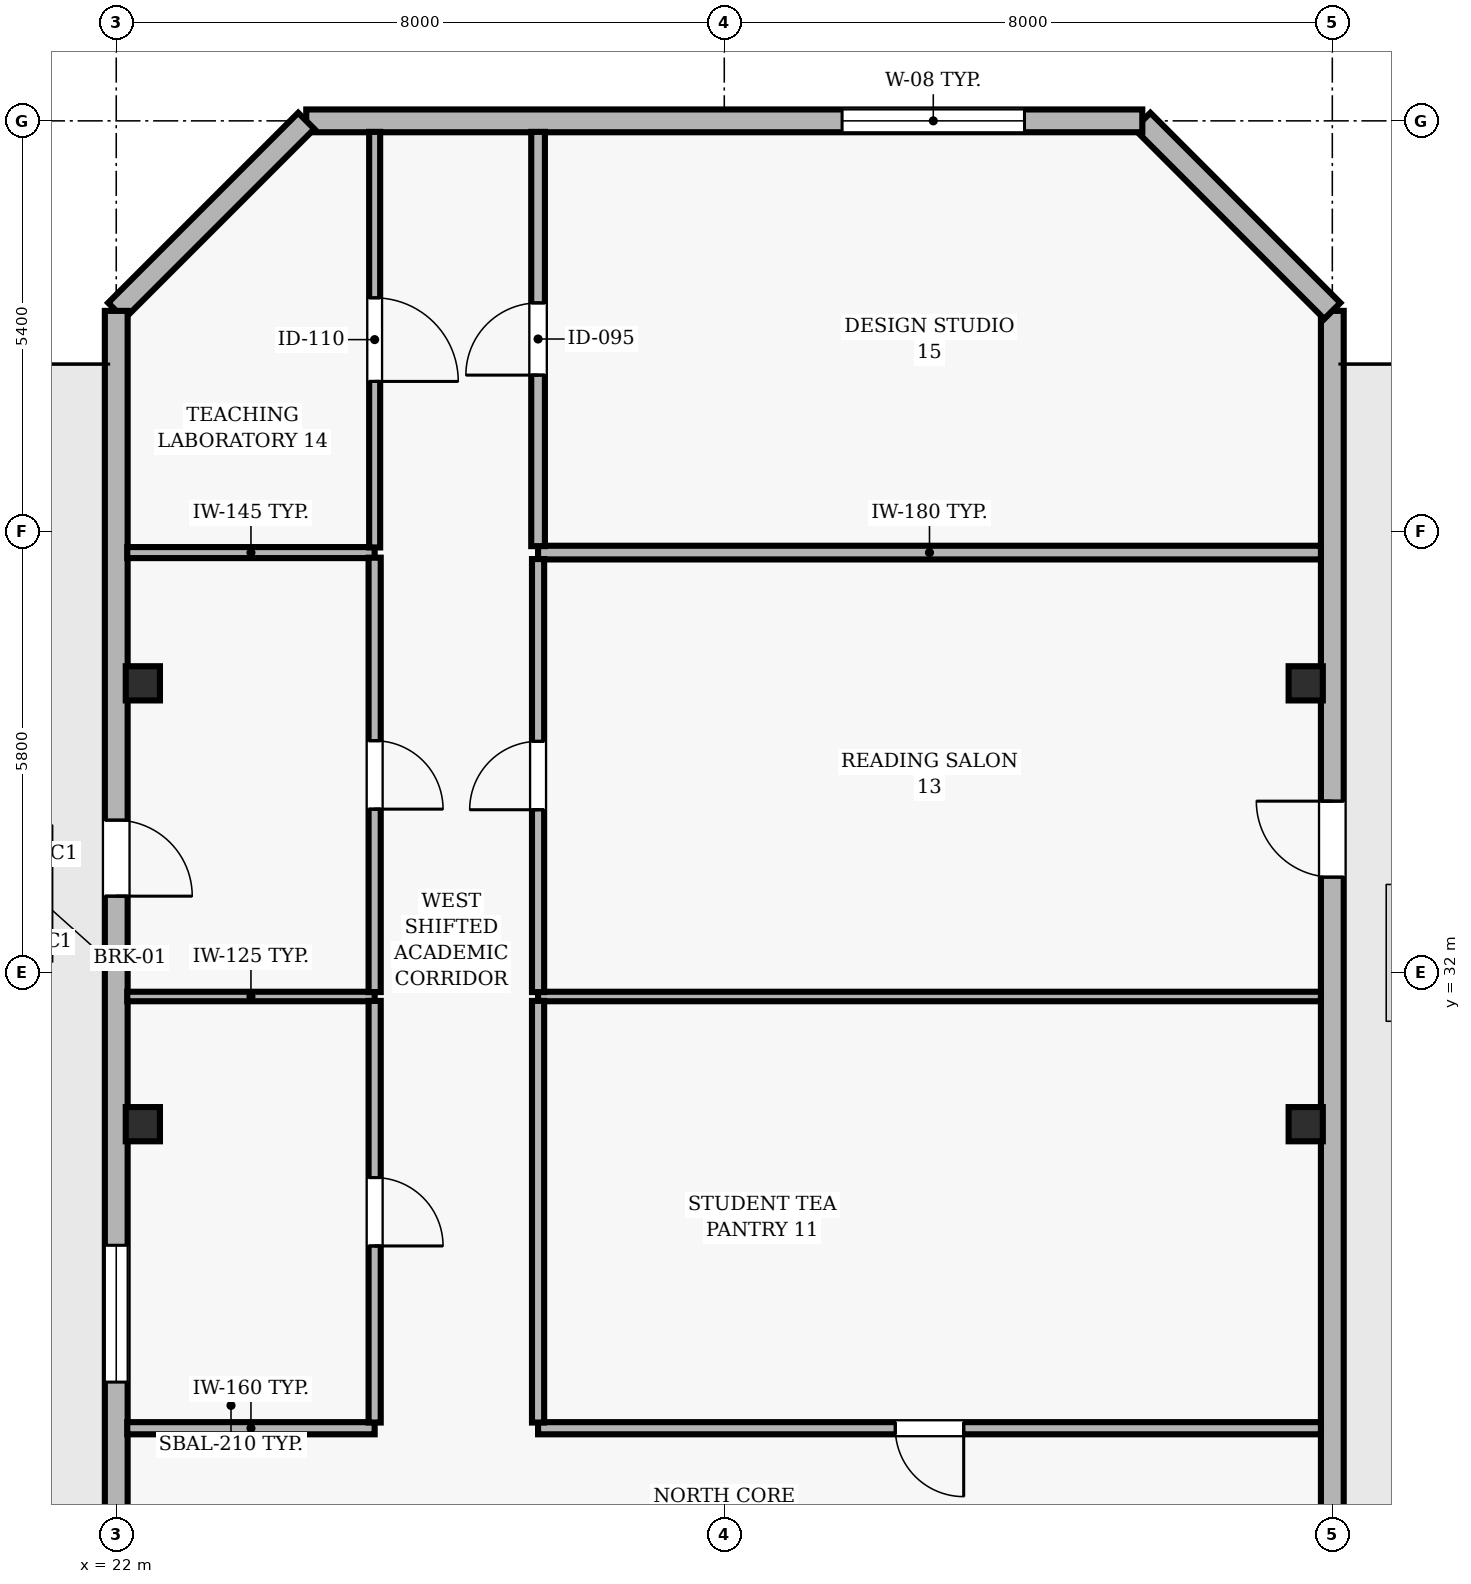
"""IFC4 building model, lengths in metres.
Left out: names, types, materials, properties, quantities, classifications, styles, units other than length and angle.
Written with IfcOpenShell. Run it as: python <this file> out.ifc"""

import sys

from ifc_helpers import new_model, si_unit, direction, frame, frame_2d, origin, origin_2d, place, context, subcontext, project, spatial, rectangle, hollow_rectangle, extrude, element, fill, save


model = new_model("IFC4")
c1 = context("Model", 3, precision=1e-05, world=origin(), true_north=direction((0.0, 1.0)))
c2 = subcontext(c1, "Body", "Model", "MODEL_VIEW")
j1 = project(units=[si_unit("LENGTHUNIT", "METRE"), si_unit("PLANEANGLEUNIT", "RADIAN")], contexts=[c1])
p1 = place(None, origin())
s1 = spatial("IfcSite", under=j1, at=p1, CompositionType="ELEMENT")
p2 = place(p1, origin())
s2 = spatial("IfcBuilding", under=s1, at=p2, CompositionType="ELEMENT")
p3 = place(p2, frame((0.0, 0.0, 234.3)))
s3 = spatial("IfcBuildingStorey", under=s2, at=p3, CompositionType="ELEMENT", Elevation=234.3)
for number, where, z_axis, x_axis in (
    (1, (22.35, 30.0, 0.0), (0.0, 0.0, 1.0), (1.0, 0.0, 0.0)),
    (2, (37.65, 30.0, 0.0), (0.0, 0.0, 1.0), (1.0, 0.0, 0.0)),
    (3, (22.35, 35.8, 0.0), (0.0, 0.0, 1.0), (1.0, 0.0, 0.0)),
    (4, (37.65, 35.8, 0.0), (0.0, 0.0, 1.0), (1.0, 0.0, 0.0)),
):
    element("IfcColumn", number, at=place(p3, frame(where, z_axis=z_axis, x_axis=x_axis)), inside=s3, PredefinedType="COLUMN", context=c2, shape_type="SweptSolid", body=[
        extrude(hollow_rectangle(XDim=0.45, YDim=0.45, WallThickness=0.02, at=origin_2d()), origin(), (0.0, 0.0, 1.0), 3.9),
    ])
p4 = place(p3, frame((38.0, 22.2, 0.0), z_axis=(0.0, 0.0, 1.0), x_axis=(0.0, 1.0, 0.0)))
e5 = element("IfcWall", 5, at=p4, inside=s3, PredefinedType="SOLIDWALL", context=c2, shape_type="SweptSolid", body=[
    extrude(rectangle(XDim=18.5, YDim=0.3, at=frame_2d((9.25, 0.0))), origin(), (0.0, 0.0, 1.0), 3.64),
])
p5 = place(p4, frame((11.05, 0.0, 0.0)))
e6 = element("IfcOpeningElement", 6, at=p5, cuts=e5, PredefinedType="OPENING", context=c2, shape_type="SweptSolid", body=[
    extrude(rectangle(XDim=1.0, YDim=2.2, at=frame_2d((0.5, 1.1))), frame((0.0, 0.16, 0.0), z_axis=(0.0, -1.0, 0.0), x_axis=(1.0, 0.0, 0.0)), (0.0, 0.0, 1.0), 0.32),
])
p6 = place(p3, frame((38.0, 40.7, 0.0), z_axis=(0.0, 0.0, 1.0), x_axis=(-0.707106781187, 0.707106781187, 0.0)))
e7 = element("IfcWall", 7, at=p6, inside=s3, PredefinedType="SOLIDWALL", context=c2, shape_type="SweptSolid", body=[
    extrude(rectangle(XDim=3.536, YDim=0.3, at=frame_2d((1.768, 0.0))), origin(), (0.0, 0.0, 1.0), 3.64),
])
p7 = place(p3, frame((35.5, 43.2, 0.0), z_axis=(0.0, 0.0, 1.0), x_axis=(-1.0, 0.0, 0.0)))
e8 = element("IfcWall", 8, at=p7, inside=s3, PredefinedType="SOLIDWALL", context=c2, shape_type="SweptSolid", body=[
    extrude(rectangle(XDim=11.0, YDim=0.3, at=frame_2d((5.5, 0.0))), origin(), (0.0, 0.0, 1.0), 3.64),
])
p8 = place(p7, frame((1.55, 0.0, 0.9)))
e9 = element("IfcOpeningElement", 9, at=p8, cuts=e8, PredefinedType="OPENING", context=c2, shape_type="SweptSolid", body=[
    extrude(rectangle(XDim=2.4, YDim=1.8, at=frame_2d((1.2, 0.9))), frame((0.0, 0.16, 0.0), z_axis=(0.0, -1.0, 0.0), x_axis=(1.0, 0.0, 0.0)), (0.0, 0.0, 1.0), 0.32),
])
p9 = place(p3, frame((24.5, 43.2, 0.0), z_axis=(0.0, 0.0, 1.0), x_axis=(-0.707106781187, -0.707106781187, 0.0)))
e10 = element("IfcWall", 10, at=p9, inside=s3, PredefinedType="SOLIDWALL", context=c2, shape_type="SweptSolid", body=[
    extrude(rectangle(XDim=3.536, YDim=0.3, at=frame_2d((1.768, 0.0))), origin(), (0.0, 0.0, 1.0), 3.64),
])
p10 = place(p3, frame((22.0, 40.7, 0.0), z_axis=(0.0, 0.0, 1.0), x_axis=(0.0, -1.0, 0.0)))
e11 = element("IfcWall", 11, at=p10, inside=s3, PredefinedType="SOLIDWALL", context=c2, shape_type="SweptSolid", body=[
    extrude(rectangle(XDim=38.2, YDim=0.3, at=frame_2d((19.1, 0.0))), origin(), (0.0, 0.0, 1.0), 3.64),
])
p11 = place(p10, frame((6.7, 0.0, 0.0)))
e12 = element("IfcOpeningElement", 12, at=p11, cuts=e11, PredefinedType="OPENING", context=c2, shape_type="SweptSolid", body=[
    extrude(rectangle(XDim=1.0, YDim=2.2, at=frame_2d((0.5, 1.1))), frame((0.0, 0.16, 0.0), z_axis=(0.0, -1.0, 0.0), x_axis=(1.0, 0.0, 0.0)), (0.0, 0.0, 1.0), 0.32),
])
p12 = place(p10, frame((12.293, 0.0, 0.9)))
e13 = element("IfcOpeningElement", 13, at=p12, cuts=e11, PredefinedType="OPENING", context=c2, shape_type="SweptSolid", body=[
    extrude(rectangle(XDim=1.8, YDim=2.2, at=frame_2d((0.9, 1.1))), frame((0.0, 0.16, 0.0), z_axis=(0.0, -1.0, 0.0), x_axis=(1.0, 0.0, 0.0)), (0.0, 0.0, 1.0), 0.32),
])
p13 = place(p10, frame((18.2, 0.0, 0.9)))
e14 = element("IfcOpeningElement", 14, at=p13, cuts=e11, PredefinedType="OPENING", context=c2, shape_type="SweptSolid", body=[
    extrude(rectangle(XDim=1.8, YDim=2.2, at=frame_2d((0.9, 1.1))), frame((0.0, 0.16, 0.0), z_axis=(0.0, -1.0, 0.0), x_axis=(1.0, 0.0, 0.0)), (0.0, 0.0, 1.0), 0.32),
])
p14 = place(p10, frame((23.207, 0.0, 0.9)))
e15 = element("IfcOpeningElement", 15, at=p14, cuts=e11, PredefinedType="OPENING", context=c2, shape_type="SweptSolid", body=[
    extrude(rectangle(XDim=1.8, YDim=2.2, at=frame_2d((0.9, 1.1))), frame((0.0, 0.16, 0.0), z_axis=(0.0, -1.0, 0.0), x_axis=(1.0, 0.0, 0.0)), (0.0, 0.0, 1.0), 0.32),
])
p15 = place(p10, frame((29.114, 0.0, 0.9)))
e16 = element("IfcOpeningElement", 16, at=p15, cuts=e11, PredefinedType="OPENING", context=c2, shape_type="SweptSolid", body=[
    extrude(rectangle(XDim=1.8, YDim=2.2, at=frame_2d((0.9, 1.1))), frame((0.0, 0.16, 0.0), z_axis=(0.0, -1.0, 0.0), x_axis=(1.0, 0.0, 0.0)), (0.0, 0.0, 1.0), 0.32),
])
p16 = place(p3, frame((25.4, 26.0, 0.0), z_axis=(0.0, 0.0, 1.0), x_axis=(-1.0, 0.0, 0.0)))
e17 = element("IfcWall", 17, at=p16, inside=s3, PredefinedType="PARTITIONING", context=c2, shape_type="SweptSolid", body=[
    extrude(rectangle(XDim=3.255, YDim=0.16, at=frame_2d((1.627, 0.0))), origin(), (0.0, 0.0, 1.0), 3.64),
])
p17 = place(p3, frame((25.4, 31.68, 0.0), z_axis=(0.0, 0.0, 1.0), x_axis=(-1.0, 0.0, 0.0)))
e18 = element("IfcWall", 18, at=p17, inside=s3, PredefinedType="PARTITIONING", context=c2, shape_type="SweptSolid", body=[
    extrude(rectangle(XDim=3.255, YDim=0.125, at=frame_2d((1.627, 0.0))), origin(), (0.0, 0.0, 1.0), 3.64),
])
p18 = place(p3, frame((25.4, 37.52, 0.0), z_axis=(0.0, 0.0, 1.0), x_axis=(-1.0, 0.0, 0.0)))
e19 = element("IfcWall", 19, at=p18, inside=s3, PredefinedType="PARTITIONING", context=c2, shape_type="SweptSolid", body=[
    extrude(rectangle(XDim=3.255, YDim=0.145, at=frame_2d((1.627, 0.0))), origin(), (0.0, 0.0, 1.0), 3.64),
])
p19 = place(p3, frame((37.85, 26.0, 0.0), z_axis=(0.0, 0.0, 1.0), x_axis=(-1.0, 0.0, 0.0)))
e20 = element("IfcWall", 20, at=p19, inside=s3, PredefinedType="PARTITIONING", context=c2, shape_type="SweptSolid", body=[
    extrude(rectangle(XDim=10.3, YDim=0.16, at=frame_2d((5.15, 0.0))), origin(), (0.0, 0.0, 1.0), 3.64),
])
p20 = place(p19, frame((4.7, 0.0, 0.0)))
e21 = element("IfcOpeningElement", 21, at=p20, cuts=e20, PredefinedType="OPENING", context=c2, shape_type="SweptSolid", body=[
    extrude(rectangle(XDim=0.9, YDim=2.1, at=frame_2d((0.45, 1.05))), frame((0.0, 0.09, 0.0), z_axis=(0.0, -1.0, 0.0), x_axis=(1.0, 0.0, 0.0)), (0.0, 0.0, 1.0), 0.18),
])
p21 = place(p3, frame((37.85, 31.68, 0.0), z_axis=(0.0, 0.0, 1.0), x_axis=(-1.0, 0.0, 0.0)))
e22 = element("IfcWall", 22, at=p21, inside=s3, PredefinedType="PARTITIONING", context=c2, shape_type="SweptSolid", body=[
    extrude(rectangle(XDim=10.3, YDim=0.125, at=frame_2d((5.15, 0.0))), origin(), (0.0, 0.0, 1.0), 3.64),
])
p22 = place(p3, frame((37.85, 37.52, 0.0), z_axis=(0.0, 0.0, 1.0), x_axis=(-1.0, 0.0, 0.0)))
e23 = element("IfcWall", 23, at=p22, inside=s3, PredefinedType="PARTITIONING", context=c2, shape_type="SweptSolid", body=[
    extrude(rectangle(XDim=10.3, YDim=0.18, at=frame_2d((5.15, 0.0))), origin(), (0.0, 0.0, 1.0), 3.64),
])
p23 = place(p3, frame((25.4, 31.622, 0.0), z_axis=(0.0, 0.0, 1.0), x_axis=(0.0, -1.0, 0.0)))
e24 = element("IfcWall", 24, at=p23, inside=s3, PredefinedType="PARTITIONING", context=c2, shape_type="SweptSolid", body=[
    extrude(rectangle(XDim=5.547, YDim=0.16, at=frame_2d((2.773, 0.0))), origin(), (0.0, 0.0, 1.0), 3.64),
])
p24 = place(p23, frame((2.324, 0.0, 0.0)))
e25 = element("IfcOpeningElement", 25, at=p24, cuts=e24, PredefinedType="OPENING", context=c2, shape_type="SweptSolid", body=[
    extrude(rectangle(XDim=0.9, YDim=2.1, at=frame_2d((0.45, 1.05))), frame((0.0, 0.09, 0.0), z_axis=(0.0, -1.0, 0.0), x_axis=(1.0, 0.0, 0.0)), (0.0, 0.0, 1.0), 0.18),
])
p25 = place(p3, frame((25.4, 37.453, 0.0), z_axis=(0.0, 0.0, 1.0), x_axis=(0.0, -1.0, 0.0)))
e26 = element("IfcWall", 26, at=p25, inside=s3, PredefinedType="PARTITIONING", context=c2, shape_type="SweptSolid", body=[
    extrude(rectangle(XDim=5.715, YDim=0.16, at=frame_2d((2.857, 0.0))), origin(), (0.0, 0.0, 1.0), 3.64),
])
p26 = place(p25, frame((2.408, 0.0, 0.0)))
e27 = element("IfcOpeningElement", 27, at=p26, cuts=e26, PredefinedType="OPENING", context=c2, shape_type="SweptSolid", body=[
    extrude(rectangle(XDim=0.9, YDim=2.1, at=frame_2d((0.45, 1.05))), frame((0.0, 0.09, 0.0), z_axis=(0.0, -1.0, 0.0), x_axis=(1.0, 0.0, 0.0)), (0.0, 0.0, 1.0), 0.18),
])
p27 = place(p3, frame((25.4, 43.055, 0.0), z_axis=(0.0, 0.0, 1.0), x_axis=(0.0, -1.0, 0.0)))
e28 = element("IfcWall", 28, at=p27, inside=s3, PredefinedType="PARTITIONING", context=c2, shape_type="SweptSolid", body=[
    extrude(rectangle(XDim=5.467, YDim=0.145, at=frame_2d((2.733, 0.0))), origin(), (0.0, 0.0, 1.0), 3.64),
])
p28 = place(p27, frame((2.183, 0.0, 0.0)))
e29 = element("IfcOpeningElement", 29, at=p28, cuts=e28, PredefinedType="OPENING", context=c2, shape_type="SweptSolid", body=[
    extrude(rectangle(XDim=1.1, YDim=2.15, at=frame_2d((0.55, 1.075))), frame((0.0, 0.083, 0.0), z_axis=(0.0, -1.0, 0.0), x_axis=(1.0, 0.0, 0.0)), (0.0, 0.0, 1.0), 0.165),
])
p29 = place(p3, frame((27.55, 26.075, 0.0), z_axis=(0.0, 0.0, 1.0), x_axis=(0.0, 1.0, 0.0)))
e30 = element("IfcWall", 30, at=p29, inside=s3, PredefinedType="PARTITIONING", context=c2, shape_type="SweptSolid", body=[
    extrude(rectangle(XDim=5.547, YDim=0.16, at=frame_2d((2.773, 0.0))), origin(), (0.0, 0.0, 1.0), 3.64),
])
p30 = place(p3, frame((27.55, 31.738, 0.0), z_axis=(0.0, 0.0, 1.0), x_axis=(0.0, 1.0, 0.0)))
e31 = element("IfcWall", 31, at=p30, inside=s3, PredefinedType="PARTITIONING", context=c2, shape_type="SweptSolid", body=[
    extrude(rectangle(XDim=5.697, YDim=0.16, at=frame_2d((2.849, 0.0))), origin(), (0.0, 0.0, 1.0), 3.64),
])
p31 = place(p30, frame((2.399, 0.0, 0.0)))
e32 = element("IfcOpeningElement", 32, at=p31, cuts=e31, PredefinedType="OPENING", context=c2, shape_type="SweptSolid", body=[
    extrude(rectangle(XDim=0.9, YDim=2.1, at=frame_2d((0.45, 1.05))), frame((0.0, 0.09, 0.0), z_axis=(0.0, -1.0, 0.0), x_axis=(1.0, 0.0, 0.0)), (0.0, 0.0, 1.0), 0.18),
])
p32 = place(p3, frame((27.55, 37.605, 0.0), z_axis=(0.0, 0.0, 1.0), x_axis=(0.0, 1.0, 0.0)))
e33 = element("IfcWall", 33, at=p32, inside=s3, PredefinedType="PARTITIONING", context=c2, shape_type="SweptSolid", body=[
    extrude(rectangle(XDim=5.45, YDim=0.18, at=frame_2d((2.725, 0.0))), origin(), (0.0, 0.0, 1.0), 3.64),
])
p33 = place(p32, frame((2.25, 0.0, 0.0)))
e34 = element("IfcOpeningElement", 34, at=p33, cuts=e33, PredefinedType="OPENING", context=c2, shape_type="SweptSolid", body=[
    extrude(rectangle(XDim=0.95, YDim=2.1, at=frame_2d((0.475, 1.05))), frame((0.0, 0.1, 0.0), z_axis=(0.0, -1.0, 0.0), x_axis=(1.0, 0.0, 0.0)), (0.0, 0.0, 1.0), 0.2),
])
p34 = place(p5, origin())
e35 = element("IfcDoor", 35, at=p34, inside=s3, OperationType="SINGLE_SWING_RIGHT", PredefinedType="DOOR", context=c2, shape_type="SweptSolid", body=[
    extrude(rectangle(XDim=1.0, YDim=2.2, at=frame_2d((0.5, 1.1))), frame((0.0, 0.025, 0.0), z_axis=(0.0, -1.0, 0.0), x_axis=(1.0, 0.0, 0.0)), (0.0, 0.0, 1.0), 0.05),
])
fill(e6, e35)
p35 = place(p8, origin())
e36 = element("IfcWindow", 36, at=p35, inside=s3, PartitioningType="SINGLE_PANEL", PredefinedType="WINDOW", context=c2, shape_type="SweptSolid", body=[
    extrude(rectangle(XDim=2.4, YDim=1.8, at=frame_2d((1.2, 0.9))), frame((0.0, 0.03, 0.0), z_axis=(0.0, -1.0, 0.0), x_axis=(1.0, 0.0, 0.0)), (0.0, 0.0, 1.0), 0.06),
])
fill(e9, e36)
p36 = place(p11, origin())
e37 = element("IfcDoor", 37, at=p36, inside=s3, OperationType="SINGLE_SWING_RIGHT", PredefinedType="DOOR", context=c2, shape_type="SweptSolid", body=[
    extrude(rectangle(XDim=1.0, YDim=2.2, at=frame_2d((0.5, 1.1))), frame((0.0, 0.025, 0.0), z_axis=(0.0, -1.0, 0.0), x_axis=(1.0, 0.0, 0.0)), (0.0, 0.0, 1.0), 0.05),
])
fill(e12, e37)
p37 = place(p12, origin())
e38 = element("IfcWindow", 38, at=p37, inside=s3, PartitioningType="SINGLE_PANEL", PredefinedType="WINDOW", context=c2, shape_type="SweptSolid", body=[
    extrude(rectangle(XDim=1.8, YDim=2.2, at=frame_2d((0.9, 1.1))), frame((0.0, 0.03, 0.0), z_axis=(0.0, -1.0, 0.0), x_axis=(1.0, 0.0, 0.0)), (0.0, 0.0, 1.0), 0.06),
])
fill(e13, e38)
p38 = place(p24, origin())
e39 = element("IfcDoor", 39, at=p38, inside=s3, OperationType="SINGLE_SWING_RIGHT", PredefinedType="DOOR", context=c2, shape_type="SweptSolid", body=[
    extrude(rectangle(XDim=0.9, YDim=2.1, at=frame_2d((0.45, 1.05))), frame((0.0, 0.025, 0.0), z_axis=(0.0, -1.0, 0.0), x_axis=(1.0, 0.0, 0.0)), (0.0, 0.0, 1.0), 0.05),
])
fill(e25, e39)
p39 = place(p20, origin())
e40 = element("IfcDoor", 40, at=p39, inside=s3, OperationType="SINGLE_SWING_LEFT", PredefinedType="DOOR", context=c2, shape_type="SweptSolid", body=[
    extrude(rectangle(XDim=0.9, YDim=2.1, at=frame_2d((0.45, 1.05))), frame((0.0, 0.025, 0.0), z_axis=(0.0, -1.0, 0.0), x_axis=(1.0, 0.0, 0.0)), (0.0, 0.0, 1.0), 0.05),
])
fill(e21, e40)
p40 = place(p26, origin())
e41 = element("IfcDoor", 41, at=p40, inside=s3, OperationType="SINGLE_SWING_RIGHT", PredefinedType="DOOR", context=c2, shape_type="SweptSolid", body=[
    extrude(rectangle(XDim=0.9, YDim=2.1, at=frame_2d((0.45, 1.05))), frame((0.0, 0.025, 0.0), z_axis=(0.0, -1.0, 0.0), x_axis=(1.0, 0.0, 0.0)), (0.0, 0.0, 1.0), 0.05),
])
fill(e27, e41)
p41 = place(p31, origin())
e42 = element("IfcDoor", 42, at=p41, inside=s3, OperationType="SINGLE_SWING_LEFT", PredefinedType="DOOR", context=c2, shape_type="SweptSolid", body=[
    extrude(rectangle(XDim=0.9, YDim=2.1, at=frame_2d((0.45, 1.05))), frame((0.0, 0.025, 0.0), z_axis=(0.0, -1.0, 0.0), x_axis=(1.0, 0.0, 0.0)), (0.0, 0.0, 1.0), 0.05),
])
fill(e32, e42)
p42 = place(p28, origin())
e43 = element("IfcDoor", 43, at=p42, inside=s3, OperationType="SINGLE_SWING_RIGHT", PredefinedType="DOOR", context=c2, shape_type="SweptSolid", body=[
    extrude(rectangle(XDim=1.1, YDim=2.15, at=frame_2d((0.55, 1.075))), frame((0.0, 0.025, 0.0), z_axis=(0.0, -1.0, 0.0), x_axis=(1.0, 0.0, 0.0)), (0.0, 0.0, 1.0), 0.05),
])
fill(e29, e43)
p43 = place(p33, origin())
e44 = element("IfcDoor", 44, at=p43, inside=s3, OperationType="SINGLE_SWING_LEFT", PredefinedType="DOOR", context=c2, shape_type="SweptSolid", body=[
    extrude(rectangle(XDim=0.95, YDim=2.1, at=frame_2d((0.475, 1.05))), frame((0.0, 0.025, 0.0), z_axis=(0.0, -1.0, 0.0), x_axis=(1.0, 0.0, 0.0)), (0.0, 0.0, 1.0), 0.05),
])
fill(e34, e44)
save(model, sys.argv[1])
